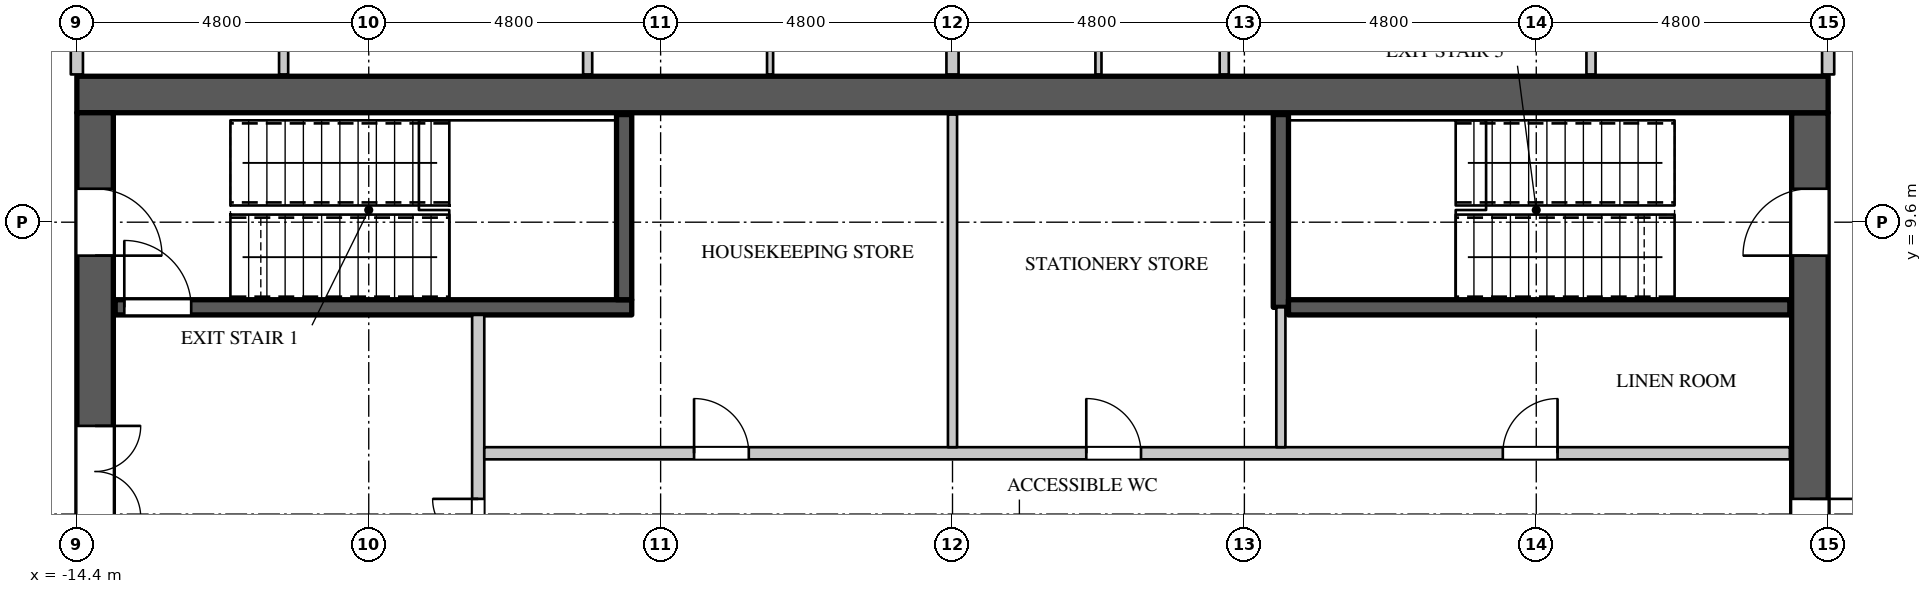
"""IFC4 building model, lengths in metres.
Left out: names, types, materials, properties, quantities, classifications, styles, units other than length and angle.
Written with IfcOpenShell. Run it as: python <this file> out.ifc"""

import sys

from ifc_helpers import new_model, si_unit, direction, frame, frame_2d, origin, place, context, subcontext, project, spatial, rectangle, extrude, element, fill, save


model = new_model("IFC4")
c1 = context("Model", 3, precision=1e-05, world=origin(), true_north=direction((0.0, 1.0)))
c2 = subcontext(c1, "Body", "Model", "MODEL_VIEW")
j1 = project(units=[si_unit("LENGTHUNIT", "METRE"), si_unit("PLANEANGLEUNIT", "RADIAN")], contexts=[c1])
p1 = place(None, origin())
s1 = spatial("IfcSite", under=j1, at=p1, CompositionType="ELEMENT")
p2 = place(p1, origin())
s2 = spatial("IfcBuilding", under=s1, at=p2, CompositionType="ELEMENT")
p3 = place(p2, frame((0.0, 0.0, 226.5)))
s3 = spatial("IfcBuildingStorey", under=s2, at=p3, CompositionType="ELEMENT", Elevation=226.5)
p4 = place(p3, frame((-14.4, 11.7, 0.0), z_axis=(0.0, 0.0, 1.0), x_axis=(1.0, 0.0, 0.0)))
e1 = element("IfcWall", 1, at=p4, inside=s3, PredefinedType="SHEAR", context=c2, shape_type="SweptSolid", body=[
    extrude(rectangle(XDim=28.8, YDim=0.6, at=frame_2d((14.4, 0.0))), origin(), (0.0, 0.0, 1.0), 4.2),
])
p5 = place(p3, frame((14.1, -11.4, 0.0), z_axis=(0.0, 0.0, 1.0), x_axis=(0.0, 1.0, 0.0)))
e2 = element("IfcWall", 2, at=p5, inside=s3, PredefinedType="SHEAR", context=c2, shape_type="SweptSolid", body=[
    extrude(rectangle(XDim=22.8, YDim=0.6, at=frame_2d((11.4, 0.0))), origin(), (0.0, 0.0, 1.0), 4.2),
])
p6 = place(p5, frame((20.45, 0.0, 0.0)))
e3 = element("IfcOpeningElement", 3, at=p6, cuts=e2, PredefinedType="OPENING", context=c2, shape_type="SweptSolid", body=[
    extrude(rectangle(XDim=1.1, YDim=2.2, at=frame_2d((0.55, 1.1))), frame((0.0, 0.31, 0.0), z_axis=(0.0, -1.0, 0.0), x_axis=(1.0, 0.0, 0.0)), (0.0, 0.0, 1.0), 0.62),
])
p7 = place(p5, frame((1.25, 0.0, 0.0)))
e4 = element("IfcOpeningElement", 4, at=p7, cuts=e2, PredefinedType="OPENING", context=c2, shape_type="SweptSolid", body=[
    extrude(rectangle(XDim=1.1, YDim=2.2, at=frame_2d((0.55, 1.1))), frame((0.0, 0.31, 0.0), z_axis=(0.0, -1.0, 0.0), x_axis=(1.0, 0.0, 0.0)), (0.0, 0.0, 1.0), 0.62),
])
p8 = place(p5, frame((14.95, 0.0, 0.0)))
e5 = element("IfcOpeningElement", 5, at=p8, cuts=e2, PredefinedType="OPENING", context=c2, shape_type="SweptSolid", body=[
    extrude(rectangle(XDim=1.5, YDim=2.4, at=frame_2d((0.75, 1.2))), frame((0.0, 0.31, 0.0), z_axis=(0.0, -1.0, 0.0), x_axis=(1.0, 0.0, 0.0)), (0.0, 0.0, 1.0), 0.62),
])
p9 = place(p5, frame((6.35, 0.0, 0.0)))
e6 = element("IfcOpeningElement", 6, at=p9, cuts=e2, PredefinedType="OPENING", context=c2, shape_type="SweptSolid", body=[
    extrude(rectangle(XDim=1.5, YDim=2.4, at=frame_2d((0.75, 1.2))), frame((0.0, 0.31, 0.0), z_axis=(0.0, -1.0, 0.0), x_axis=(1.0, 0.0, 0.0)), (0.0, 0.0, 1.0), 0.62),
])
p10 = place(p3, frame((-14.1, -11.4, 0.0), z_axis=(0.0, 0.0, 1.0), x_axis=(0.0, 1.0, 0.0)))
e7 = element("IfcWall", 7, at=p10, inside=s3, PredefinedType="SHEAR", context=c2, shape_type="SweptSolid", body=[
    extrude(rectangle(XDim=22.8, YDim=0.6, at=frame_2d((11.4, 0.0))), origin(), (0.0, 0.0, 1.0), 4.2),
])
p11 = place(p10, frame((20.45, 0.0, 0.0)))
e8 = element("IfcOpeningElement", 8, at=p11, cuts=e7, PredefinedType="OPENING", context=c2, shape_type="SweptSolid", body=[
    extrude(rectangle(XDim=1.1, YDim=2.2, at=frame_2d((0.55, 1.1))), frame((0.0, 0.31, 0.0), z_axis=(0.0, -1.0, 0.0), x_axis=(1.0, 0.0, 0.0)), (0.0, 0.0, 1.0), 0.62),
])
p12 = place(p10, frame((1.25, 0.0, 0.0)))
e9 = element("IfcOpeningElement", 9, at=p12, cuts=e7, PredefinedType="OPENING", context=c2, shape_type="SweptSolid", body=[
    extrude(rectangle(XDim=1.1, YDim=2.2, at=frame_2d((0.55, 1.1))), frame((0.0, 0.31, 0.0), z_axis=(0.0, -1.0, 0.0), x_axis=(1.0, 0.0, 0.0)), (0.0, 0.0, 1.0), 0.62),
])
p13 = place(p10, frame((16.15, 0.0, 0.0)))
e10 = element("IfcOpeningElement", 10, at=p13, cuts=e7, PredefinedType="OPENING", context=c2, shape_type="SweptSolid", body=[
    extrude(rectangle(XDim=1.5, YDim=2.4, at=frame_2d((0.75, 1.2))), frame((0.0, 0.31, 0.0), z_axis=(0.0, -1.0, 0.0), x_axis=(1.0, 0.0, 0.0)), (0.0, 0.0, 1.0), 0.62),
])
p14 = place(p10, frame((5.15, 0.0, 0.0)))
e11 = element("IfcOpeningElement", 11, at=p14, cuts=e7, PredefinedType="OPENING", context=c2, shape_type="SweptSolid", body=[
    extrude(rectangle(XDim=1.5, YDim=2.4, at=frame_2d((0.75, 1.2))), frame((0.0, 0.31, 0.0), z_axis=(0.0, -1.0, 0.0), x_axis=(1.0, 0.0, 0.0)), (0.0, 0.0, 1.0), 0.62),
])
p15 = place(p3, frame((-14.4, 12.03, 0.0), z_axis=(0.0, 0.0, 1.0), x_axis=(0.0, 1.0, 0.0)))
e12 = element("IfcWall", 12, at=p15, inside=s3, PredefinedType="PARTITIONING", context=c2, shape_type="SweptSolid", body=[
    extrude(rectangle(XDim=2.27, YDim=0.2, at=frame_2d((1.135, 0.0))), origin(), (0.0, 0.0, 1.0), 3.95),
])
p16 = place(p3, frame((-7.8, 2.8, 0.0), z_axis=(0.0, 0.0, 1.0), x_axis=(0.0, 1.0, 0.0)))
e13 = element("IfcWall", 13, at=p16, inside=s3, PredefinedType="PARTITIONING", context=c2, shape_type="SweptSolid", body=[
    extrude(rectangle(XDim=5.275, YDim=0.2, at=frame_2d((2.637, 0.0))), origin(), (0.0, 0.0, 1.0), 3.95),
])
p17 = place(p16, frame((0.75, 0.0, 0.0)))
e14 = element("IfcOpeningElement", 14, at=p17, cuts=e13, PredefinedType="OPENING", context=c2, shape_type="SweptSolid", body=[
    extrude(rectangle(XDim=1.5, YDim=2.4, at=frame_2d((0.75, 1.2))), frame((0.0, 0.11, 0.0), z_axis=(0.0, -1.0, 0.0), x_axis=(1.0, 0.0, 0.0)), (0.0, 0.0, 1.0), 0.22),
])
p18 = place(p3, frame((-7.7, 5.8, 0.0), z_axis=(0.0, 0.0, 1.0), x_axis=(1.0, 0.0, 0.0)))
e15 = element("IfcWall", 15, at=p18, inside=s3, PredefinedType="PARTITIONING", context=c2, shape_type="SweptSolid", body=[
    extrude(rectangle(XDim=21.47, YDim=0.2, at=frame_2d((10.735, 0.0))), origin(), (0.0, 0.0, 1.0), 3.95),
])
p19 = place(p18, frame((3.45, 0.0, 0.0)))
e16 = element("IfcOpeningElement", 16, at=p19, cuts=e15, PredefinedType="OPENING", context=c2, shape_type="SweptSolid", body=[
    extrude(rectangle(XDim=0.9, YDim=2.2, at=frame_2d((0.45, 1.1))), frame((0.0, 0.11, 0.0), z_axis=(0.0, -1.0, 0.0), x_axis=(1.0, 0.0, 0.0)), (0.0, 0.0, 1.0), 0.22),
])
p20 = place(p18, frame((9.9, 0.0, 0.0)))
e17 = element("IfcOpeningElement", 17, at=p20, cuts=e15, PredefinedType="OPENING", context=c2, shape_type="SweptSolid", body=[
    extrude(rectangle(XDim=0.9, YDim=2.2, at=frame_2d((0.45, 1.1))), frame((0.0, 0.11, 0.0), z_axis=(0.0, -1.0, 0.0), x_axis=(1.0, 0.0, 0.0)), (0.0, 0.0, 1.0), 0.22),
])
p21 = place(p18, frame((16.75, 0.0, 0.0)))
e18 = element("IfcOpeningElement", 18, at=p21, cuts=e15, PredefinedType="OPENING", context=c2, shape_type="SweptSolid", body=[
    extrude(rectangle(XDim=0.9, YDim=2.2, at=frame_2d((0.45, 1.1))), frame((0.0, 0.11, 0.0), z_axis=(0.0, -1.0, 0.0), x_axis=(1.0, 0.0, 0.0)), (0.0, 0.0, 1.0), 0.22),
])
p22 = place(p3, frame((14.4, 12.03, 0.0), z_axis=(0.0, 0.0, 1.0), x_axis=(0.0, 1.0, 0.0)))
e19 = element("IfcWall", 19, at=p22, inside=s3, PredefinedType="PARTITIONING", context=c2, shape_type="SweptSolid", body=[
    extrude(rectangle(XDim=2.27, YDim=0.2, at=frame_2d((1.135, 0.0))), origin(), (0.0, 0.0, 1.0), 3.95),
])
p23 = place(p22, frame((0.55, 0.0, 0.0)))
e20 = element("IfcOpeningElement", 20, at=p23, cuts=e19, PredefinedType="OPENING", context=c2, shape_type="SweptSolid", body=[
    extrude(rectangle(XDim=1.1, YDim=2.4, at=frame_2d((0.55, 1.2))), frame((0.0, 0.11, 0.0), z_axis=(0.0, -1.0, 0.0), x_axis=(1.0, 0.0, 0.0)), (0.0, 0.0, 1.0), 0.22),
])
p24 = place(p3, frame((-11.0, 12.03, 0.0), z_axis=(0.0, 0.0, 1.0), x_axis=(0.0, 1.0, 0.0)))
e21 = element("IfcWall", 21, at=p24, inside=s3, PredefinedType="PARTITIONING", context=c2, shape_type="SweptSolid", body=[
    extrude(rectangle(XDim=5.645, YDim=0.15, at=frame_2d((2.823, 0.0))), origin(), (0.0, 0.0, 1.0), 3.95),
])
p25 = place(p24, frame((2.35, 0.0, 0.0)))
e22 = element("IfcOpeningElement", 22, at=p25, cuts=e21, PredefinedType="OPENING", context=c2, shape_type="SweptSolid", body=[
    extrude(rectangle(XDim=0.95, YDim=2.2, at=frame_2d((0.475, 1.1))), frame((0.0, 0.085, 0.0), z_axis=(0.0, -1.0, 0.0), x_axis=(1.0, 0.0, 0.0)), (0.0, 0.0, 1.0), 0.17),
])
p26 = place(p3, frame((-6.0, 12.03, 0.0), z_axis=(0.0, 0.0, 1.0), x_axis=(0.0, 1.0, 0.0)))
e23 = element("IfcWall", 23, at=p26, inside=s3, PredefinedType="PARTITIONING", context=c2, shape_type="SweptSolid", body=[
    extrude(rectangle(XDim=6.595, YDim=0.15, at=frame_2d((3.297, 0.0))), origin(), (0.0, 0.0, 1.0), 3.95),
])
p27 = place(p26, frame((2.85, 0.0, 0.0)))
e24 = element("IfcOpeningElement", 24, at=p27, cuts=e23, PredefinedType="OPENING", context=c2, shape_type="SweptSolid", body=[
    extrude(rectangle(XDim=0.9, YDim=2.2, at=frame_2d((0.45, 1.1))), frame((0.0, 0.085, 0.0), z_axis=(0.0, -1.0, 0.0), x_axis=(1.0, 0.0, 0.0)), (0.0, 0.0, 1.0), 0.17),
])
p28 = place(p3, frame((0.0, 5.9, 0.0), z_axis=(0.0, 0.0, 1.0), x_axis=(0.0, 1.0, 0.0)))
e25 = element("IfcWall", 25, at=p28, inside=s3, PredefinedType="PARTITIONING", context=c2, shape_type="SweptSolid", body=[
    extrude(rectangle(XDim=5.47, YDim=0.15, at=frame_2d((2.735, 0.0))), origin(), (0.0, 0.0, 1.0), 3.95),
])
p29 = place(p3, frame((4.469, 12.03, 0.0), z_axis=(0.0, 0.0, 1.0), x_axis=(0.0, 1.0, 0.0)))
e26 = element("IfcWall", 26, at=p29, inside=s3, PredefinedType="PARTITIONING", context=c2, shape_type="SweptSolid", body=[
    extrude(rectangle(XDim=13.92, YDim=0.15, at=frame_2d((6.96, 0.0))), origin(), (0.0, 0.0, 1.0), 3.3),
])
p30 = place(p29, frame((9.65, 0.0, 0.0)))
e27 = element("IfcOpeningElement", 27, at=p30, cuts=e26, PredefinedType="OPENING", context=c2, shape_type="SweptSolid", body=[
    extrude(rectangle(XDim=0.95, YDim=2.2, at=frame_2d((0.475, 1.1))), frame((0.0, 0.085, 0.0), z_axis=(0.0, -1.0, 0.0), x_axis=(1.0, 0.0, 0.0)), (0.0, 0.0, 1.0), 0.17),
])
p31 = place(p3, frame((5.4, 5.9, 0.0), z_axis=(0.0, 0.0, 1.0), x_axis=(0.0, 1.0, 0.0)))
e28 = element("IfcWall", 28, at=p31, inside=s3, PredefinedType="PARTITIONING", context=c2, shape_type="SweptSolid", body=[
    extrude(rectangle(XDim=2.3, YDim=0.15, at=frame_2d((1.15, 0.0))), origin(), (0.0, 0.0, 1.0), 3.95),
])
p32 = place(p3, frame((10.5, 12.03, 0.0), z_axis=(0.0, 0.0, 1.0), x_axis=(0.0, 1.0, 0.0)))
e29 = element("IfcWall", 29, at=p32, inside=s3, PredefinedType="PARTITIONING", context=c2, shape_type="SweptSolid", body=[
    extrude(rectangle(XDim=5.445, YDim=0.15, at=frame_2d((2.723, 0.0))), origin(), (0.0, 0.0, 1.0), 3.95),
])
p33 = place(p32, frame((2.25, 0.0, 0.0)))
e30 = element("IfcOpeningElement", 30, at=p33, cuts=e29, PredefinedType="OPENING", context=c2, shape_type="SweptSolid", body=[
    extrude(rectangle(XDim=0.95, YDim=2.2, at=frame_2d((0.475, 1.1))), frame((0.0, 0.085, 0.0), z_axis=(0.0, -1.0, 0.0), x_axis=(1.0, 0.0, 0.0)), (0.0, 0.0, 1.0), 0.17),
])
p34 = place(p3, frame((0.0, 12.03, 0.0), z_axis=(0.0, 0.0, 1.0), x_axis=(0.0, 1.0, 0.0)))
e31 = element("IfcWall", 31, at=p34, inside=s3, PredefinedType="PARTITIONING", context=c2, shape_type="SweptSolid", body=[
    extrude(rectangle(XDim=14.425, YDim=0.2, at=frame_2d((7.212, 0.0))), origin(), (0.0, 0.0, 1.0), 3.95),
])
p35 = place(p3, frame((-13.77, 8.2, 0.0), z_axis=(0.0, 0.0, 1.0), x_axis=(1.0, 0.0, 0.0)))
e32 = element("IfcWall", 32, at=p35, inside=s3, PredefinedType="SHEAR", context=c2, shape_type="SweptSolid", body=[
    extrude(rectangle(XDim=8.495, YDim=0.25, at=frame_2d((4.248, 0.0))), origin(), (0.0, 0.0, 1.0), 3.95),
])
p36 = place(p35, frame((0.15, 0.0, 0.0)))
e33 = element("IfcOpeningElement", 33, at=p36, cuts=e32, PredefinedType="OPENING", context=c2, shape_type="SweptSolid", body=[
    extrude(rectangle(XDim=1.1, YDim=2.2, at=frame_2d((0.55, 1.1))), frame((0.0, 0.135, 0.0), z_axis=(0.0, -1.0, 0.0), x_axis=(1.0, 0.0, 0.0)), (0.0, 0.0, 1.0), 0.27),
])
p37 = place(p3, frame((-5.4, 8.325, 0.0), z_axis=(0.0, 0.0, 1.0), x_axis=(0.0, 1.0, 0.0)))
e34 = element("IfcWall", 34, at=p37, inside=s3, PredefinedType="SHEAR", context=c2, shape_type="SweptSolid", body=[
    extrude(rectangle(XDim=3.045, YDim=0.25, at=frame_2d((1.522, 0.0))), origin(), (0.0, 0.0, 1.0), 3.95),
])
p38 = place(p3, frame((5.4, 8.2, 0.0), z_axis=(0.0, 0.0, 1.0), x_axis=(0.0, 1.0, 0.0)))
e35 = element("IfcWall", 35, at=p38, inside=s3, PredefinedType="SHEAR", context=c2, shape_type="SweptSolid", body=[
    extrude(rectangle(XDim=3.17, YDim=0.25, at=frame_2d((1.585, 0.0))), origin(), (0.0, 0.0, 1.0), 3.95),
])
p39 = place(p3, frame((5.525, 8.2, 0.0), z_axis=(0.0, 0.0, 1.0), x_axis=(1.0, 0.0, 0.0)))
e36 = element("IfcWall", 36, at=p39, inside=s3, PredefinedType="SHEAR", context=c2, shape_type="SweptSolid", body=[
    extrude(rectangle(XDim=8.245, YDim=0.25, at=frame_2d((4.123, 0.0))), origin(), (0.0, 0.0, 1.0), 3.95),
])
p40 = place(p3, frame((-3.0, 12.03, 0.0), z_axis=(0.0, 0.0, 1.0), x_axis=(0.0, 1.0, 0.0)))
e37 = element("IfcWall", 37, at=p40, inside=s3, PredefinedType="PARTITIONING", context=c2, shape_type="SweptSolid", body=[
    extrude(rectangle(XDim=6.095, YDim=0.1, at=frame_2d((3.047, 0.0))), origin(), (0.0, 0.0, 1.0), 3.95),
])
p41 = place(p3, frame((2.4, 12.03, 0.0), z_axis=(0.0, 0.0, 1.0), x_axis=(0.0, 1.0, 0.0)))
e38 = element("IfcWall", 38, at=p41, inside=s3, PredefinedType="PARTITIONING", context=c2, shape_type="SweptSolid", body=[
    extrude(rectangle(XDim=5.895, YDim=0.1, at=frame_2d((2.948, 0.0))), origin(), (0.0, 0.0, 1.0), 3.95),
])
p42 = place(p19, origin())
e39 = element("IfcDoor", 39, at=p42, inside=s3, OperationType="SINGLE_SWING_LEFT", PredefinedType="DOOR", context=c2, shape_type="SweptSolid", body=[
    extrude(rectangle(XDim=0.9, YDim=2.2, at=frame_2d((0.45, 1.1))), frame((0.0, 0.025, 0.0), z_axis=(0.0, -1.0, 0.0), x_axis=(1.0, 0.0, 0.0)), (0.0, 0.0, 1.0), 0.05),
])
fill(e16, e39)
p43 = place(p20, origin())
e40 = element("IfcDoor", 40, at=p43, inside=s3, OperationType="SINGLE_SWING_LEFT", PredefinedType="DOOR", context=c2, shape_type="SweptSolid", body=[
    extrude(rectangle(XDim=0.9, YDim=2.2, at=frame_2d((0.45, 1.1))), frame((0.0, 0.025, 0.0), z_axis=(0.0, -1.0, 0.0), x_axis=(1.0, 0.0, 0.0)), (0.0, 0.0, 1.0), 0.05),
])
fill(e17, e40)
p44 = place(p21, origin())
e41 = element("IfcDoor", 41, at=p44, inside=s3, OperationType="SINGLE_SWING_RIGHT", PredefinedType="DOOR", context=c2, shape_type="SweptSolid", body=[
    extrude(rectangle(XDim=0.9, YDim=2.2, at=frame_2d((0.45, 1.1))), frame((0.0, 0.025, 0.0), z_axis=(0.0, -1.0, 0.0), x_axis=(1.0, 0.0, 0.0)), (0.0, 0.0, 1.0), 0.05),
])
fill(e18, e41)
p45 = place(p36, origin())
e42 = element("IfcDoor", 42, at=p45, inside=s3, OperationType="SINGLE_SWING_LEFT", PredefinedType="DOOR", context=c2, shape_type="SweptSolid", body=[
    extrude(rectangle(XDim=1.1, YDim=2.2, at=frame_2d((0.55, 1.1))), frame((0.0, 0.025, 0.0), z_axis=(0.0, -1.0, 0.0), x_axis=(1.0, 0.0, 0.0)), (0.0, 0.0, 1.0), 0.05),
])
fill(e33, e42)
p46 = place(p17, origin())
e43 = element("IfcDoor", 43, at=p46, inside=s3, OperationType="DOUBLE_DOOR_SINGLE_SWING", PredefinedType="DOOR", context=c2, shape_type="SweptSolid", body=[
    extrude(rectangle(XDim=1.5, YDim=2.4, at=frame_2d((0.75, 1.2))), frame((0.0, 0.025, 0.0), z_axis=(0.0, -1.0, 0.0), x_axis=(1.0, 0.0, 0.0)), (0.0, 0.0, 1.0), 0.05),
])
fill(e14, e43)
p47 = place(p11, origin())
e44 = element("IfcDoor", 44, at=p47, inside=s3, OperationType="SINGLE_SWING_RIGHT", PredefinedType="DOOR", context=c2, shape_type="SweptSolid", body=[
    extrude(rectangle(XDim=1.1, YDim=2.2, at=frame_2d((0.55, 1.1))), frame((0.0, -0.245, 0.0), z_axis=(0.0, -1.0, 0.0), x_axis=(1.0, 0.0, 0.0)), (0.0, 0.0, 1.0), 0.05),
])
fill(e8, e44)
p48 = place(p6, origin())
e45 = element("IfcDoor", 45, at=p48, inside=s3, OperationType="SINGLE_SWING_LEFT", PredefinedType="DOOR", context=c2, shape_type="SweptSolid", body=[
    extrude(rectangle(XDim=1.1, YDim=2.2, at=frame_2d((0.55, 1.1))), frame((0.0, 0.295, 0.0), z_axis=(0.0, -1.0, 0.0), x_axis=(1.0, 0.0, 0.0)), (0.0, 0.0, 1.0), 0.05),
])
fill(e3, e45)
p49 = place(p13, origin())
e46 = element("IfcDoor", 46, at=p49, inside=s3, OperationType="DOUBLE_DOOR_SINGLE_SWING", PredefinedType="DOOR", context=c2, shape_type="SweptSolid", body=[
    extrude(rectangle(XDim=1.5, YDim=2.4, at=frame_2d((0.75, 1.2))), frame((0.0, -0.245, 0.0), z_axis=(0.0, -1.0, 0.0), x_axis=(1.0, 0.0, 0.0)), (0.0, 0.0, 1.0), 0.05),
])
fill(e10, e46)
p50 = place(p8, origin())
e47 = element("IfcDoor", 47, at=p50, inside=s3, OperationType="DOUBLE_DOOR_SINGLE_SWING", PredefinedType="DOOR", context=c2, shape_type="SweptSolid", body=[
    extrude(rectangle(XDim=1.5, YDim=2.4, at=frame_2d((0.75, 1.2))), frame((0.0, -0.245, 0.0), z_axis=(0.0, -1.0, 0.0), x_axis=(1.0, 0.0, 0.0)), (0.0, 0.0, 1.0), 0.05),
])
fill(e5, e47)
save(model, sys.argv[1])
